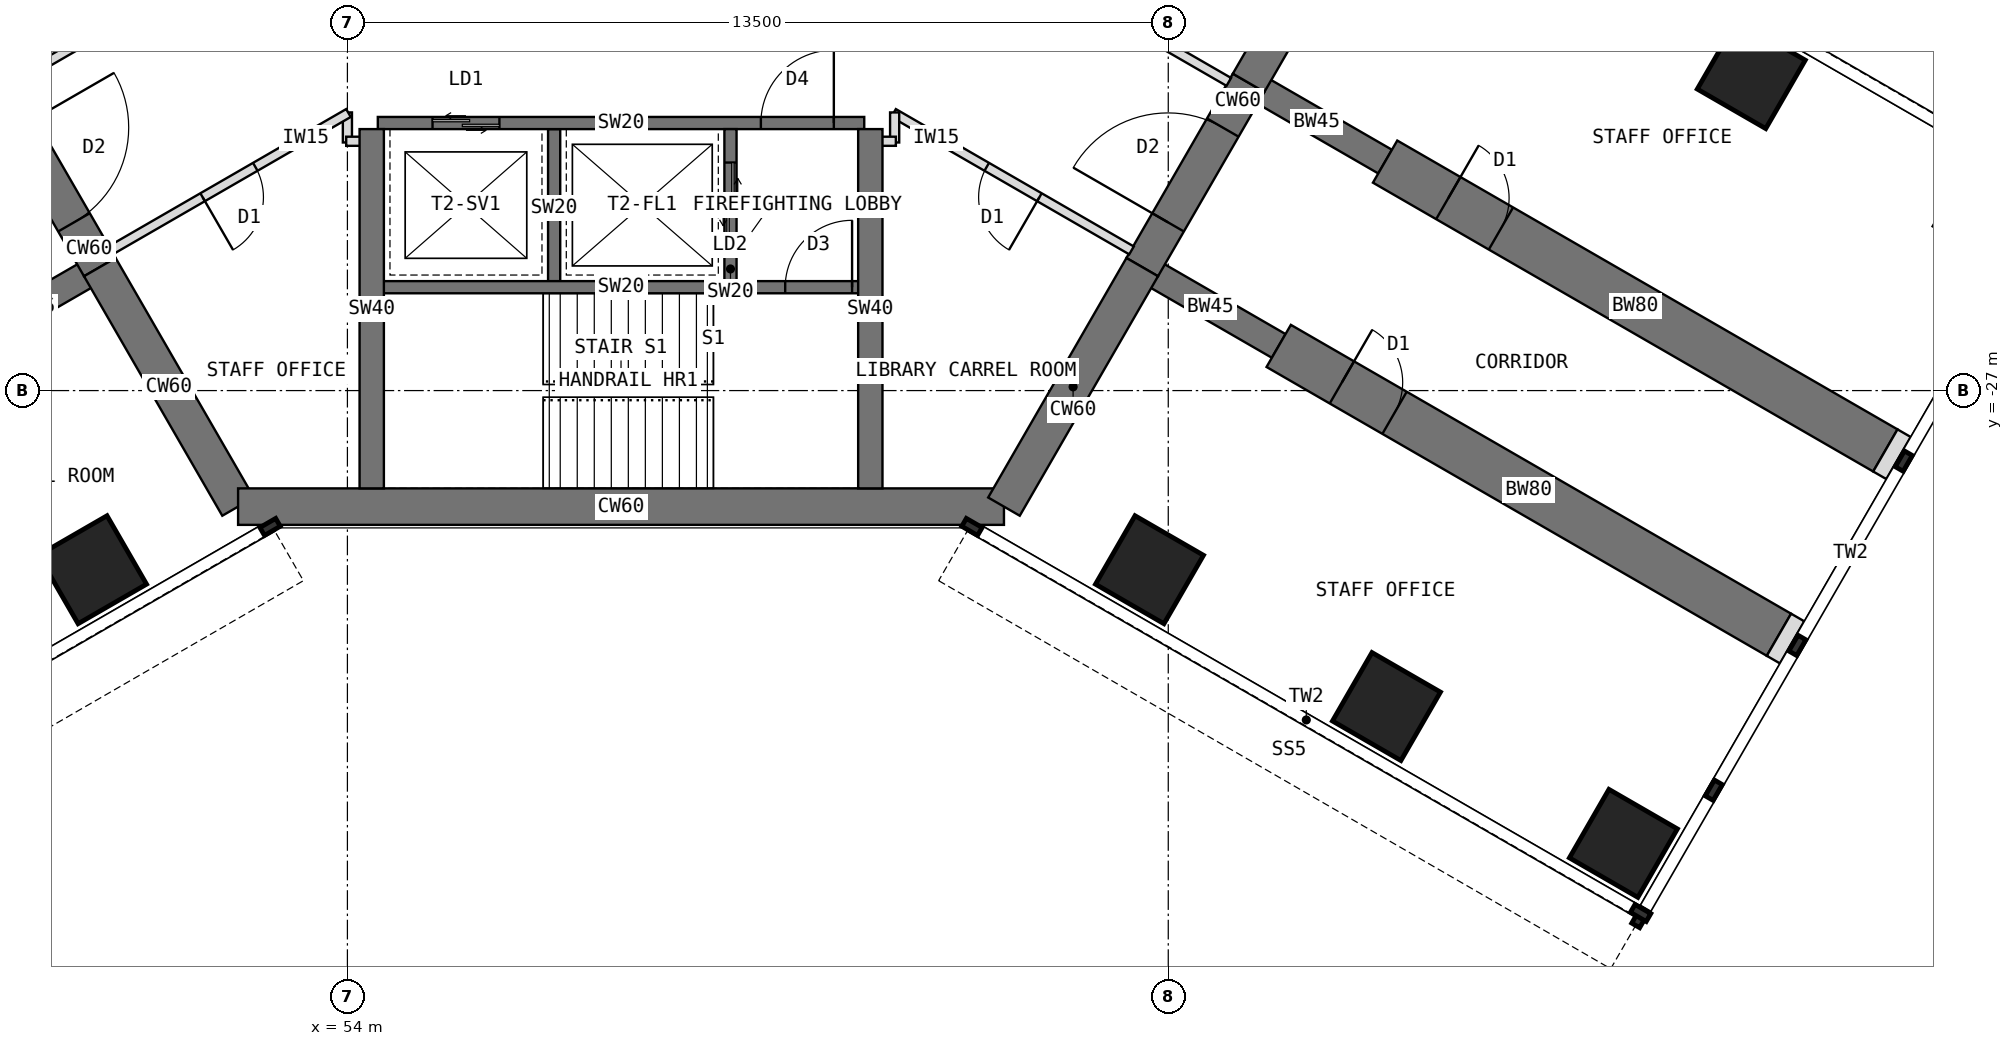
"""IFC4 building model, lengths in metres.
Left out: names, types, materials, properties, quantities, classifications, styles, units other than length and angle.
Written with IfcOpenShell. Run it as: python <this file> out.ifc"""

import sys

from ifc_helpers import new_model, si_unit, direction, frame, frame_2d, origin, origin_2d, place, context, subcontext, project, spatial, rectangle, extrude, element, fill, save


model = new_model("IFC4")
c1 = context("Model", 3, precision=1e-05, world=origin(), true_north=direction((0.0, 1.0)))
c2 = subcontext(c1, "Body", "Model", "MODEL_VIEW")
j1 = project(units=[si_unit("LENGTHUNIT", "METRE"), si_unit("PLANEANGLEUNIT", "RADIAN")], contexts=[c1])
p1 = place(None, origin())
s1 = spatial("IfcSite", under=j1, at=p1, CompositionType="ELEMENT")
p2 = place(p1, origin())
s2 = spatial("IfcBuilding", under=s1, at=p2, CompositionType="ELEMENT")
p3 = place(p2, frame((0.0, 0.0, 121.5)))
s3 = spatial("IfcBuildingStorey", under=s2, at=p3, CompositionType="ELEMENT", Elevation=121.5)
p4 = place(p3, frame((48.178, -21.939, 0.0), z_axis=(0.0, 0.0, 1.0), x_axis=(0.500010275428, -0.866019471182, 0.0)))
e1 = element("IfcWall", 1, at=p4, inside=s3, PredefinedType="SHEAR", context=c2, shape_type="SweptSolid", body=[
    extrude(rectangle(XDim=3.5, YDim=0.6, at=frame_2d((1.75, 0.0))), origin(), (0.0, 0.0, 1.0), 4.0),
])
p5 = place(p4, frame((0.85, 0.0, 0.0)))
e2 = element("IfcOpeningElement", 2, at=p5, cuts=e1, PredefinedType="OPENING", context=c2, shape_type="SweptSolid", body=[
    extrude(rectangle(XDim=1.8, YDim=2.1, at=frame_2d((0.9, 1.05))), frame((0.0, 0.31, 0.0), z_axis=(0.0, -1.0, 0.0), x_axis=(1.0, 0.0, 0.0)), (0.0, 0.0, 1.0), 0.62),
])
p6 = place(p3, frame((49.928, -24.97, 0.0), z_axis=(0.0, 0.0, 1.0), x_axis=(0.499984222037, -0.866034513004, 0.0)))
e3 = element("IfcWall", 3, at=p6, inside=s3, PredefinedType="SHEAR", context=c2, shape_type="SweptSolid", body=[
    extrude(rectangle(XDim=4.548, YDim=0.6, at=frame_2d((2.274, 0.0))), origin(), (0.0, 0.0, 1.0), 4.0),
])
p7 = place(p3, frame((52.202, -28.908, 0.0), z_axis=(0.0, 0.0, 1.0), x_axis=(1.0, 0.0, 0.0)))
e4 = element("IfcWall", 4, at=p7, inside=s3, PredefinedType="SHEAR", context=c2, shape_type="SweptSolid", body=[
    extrude(rectangle(XDim=12.596, YDim=0.6, at=frame_2d((6.298, 0.0))), origin(), (0.0, 0.0, 1.0), 4.0),
])
p8 = place(p3, frame((64.798, -28.908, 0.0), z_axis=(0.0, 0.0, 1.0), x_axis=(0.499984222037, 0.866034513004, 0.0)))
e5 = element("IfcWall", 5, at=p8, inside=s3, PredefinedType="SHEAR", context=c2, shape_type="SweptSolid", body=[
    extrude(rectangle(XDim=4.548, YDim=0.6, at=frame_2d((2.274, 0.0))), origin(), (0.0, 0.0, 1.0), 4.0),
])
p9 = place(p3, frame((67.072, -24.97, 0.0), z_axis=(0.0, 0.0, 1.0), x_axis=(0.500010275428, 0.866019471182, 0.0)))
e6 = element("IfcWall", 6, at=p9, inside=s3, PredefinedType="SHEAR", context=c2, shape_type="SweptSolid", body=[
    extrude(rectangle(XDim=3.5, YDim=0.6, at=frame_2d((1.75, 0.0))), origin(), (0.0, 0.0, 1.0), 4.0),
])
p10 = place(p9, frame((0.85, 0.0, 0.0)))
e7 = element("IfcOpeningElement", 7, at=p10, cuts=e6, PredefinedType="OPENING", context=c2, shape_type="SweptSolid", body=[
    extrude(rectangle(XDim=1.8, YDim=2.1, at=frame_2d((0.9, 1.05))), frame((0.0, 0.31, 0.0), z_axis=(0.0, -1.0, 0.0), x_axis=(1.0, 0.0, 0.0)), (0.0, 0.0, 1.0), 0.62),
])
p11 = place(p3, frame((68.822, -21.939, 0.0), z_axis=(0.0, 0.0, 1.0), x_axis=(0.500024481964, 0.866011268655, 0.0)))
e8 = element("IfcWall", 8, at=p11, inside=s3, PredefinedType="SHEAR", context=c2, shape_type="SweptSolid", body=[
    extrude(rectangle(XDim=4.548, YDim=0.6, at=frame_2d((2.274, 0.0))), origin(), (0.0, 0.0, 1.0), 4.0),
])
for number, where, z_axis, x_axis in (
    (9, (49.928, -24.97, 0.0), (0.0, 0.0, 1.0), (-0.866, -0.5, 0.0)),
    (10, (68.822, -21.939, 0.0), (0.0, 0.0, 1.0), (0.866, -0.5, 0.0)),
):
    element("IfcWall", number, at=place(p3, frame(where, z_axis=z_axis, x_axis=x_axis)), inside=s3, PredefinedType="SHEAR", context=c2, shape_type="SweptSolid", body=[
        extrude(rectangle(XDim=2.592, YDim=0.45, at=frame_2d((1.296, 0.0))), origin(), (0.0, 0.0, 1.0), 4.0),
    ])
p12 = place(p3, frame((71.066, -23.234, 0.0), z_axis=(0.0, 0.0, 1.0), x_axis=(0.86602681393, -0.499997557548, 0.0)))
e11 = element("IfcWall", 11, at=p12, inside=s3, PredefinedType="SHEAR", context=c2, shape_type="SweptSolid", body=[
    extrude(rectangle(XDim=9.5, YDim=0.8, at=frame_2d((4.75, 0.0))), origin(), (0.0, 0.0, 1.0), 4.0),
])
p13 = place(p12, frame((1.2, 0.0, 0.0)))
e12 = element("IfcOpeningElement", 12, at=p13, cuts=e11, PredefinedType="OPENING", context=c2, shape_type="SweptSolid", body=[
    extrude(rectangle(XDim=1.0, YDim=2.1, at=frame_2d((0.5, 1.05))), frame((0.0, 0.41, 0.0), z_axis=(0.0, -1.0, 0.0), x_axis=(1.0, 0.0, 0.0)), (0.0, 0.0, 1.0), 0.82),
])
p14 = place(p3, frame((67.072, -24.97, 0.0), z_axis=(0.0, 0.0, 1.0), x_axis=(0.866031863473, -0.499988811324, 0.0)))
e13 = element("IfcWall", 13, at=p14, inside=s3, PredefinedType="SHEAR", context=c2, shape_type="SweptSolid", body=[
    extrude(rectangle(XDim=2.592, YDim=0.45, at=frame_2d((1.296, 0.0))), origin(), (0.0, 0.0, 1.0), 4.0),
])
p15 = place(p3, frame((69.316, -26.266, 0.0), z_axis=(0.0, 0.0, 1.0), x_axis=(0.86602681393, -0.499997557548, 0.0)))
e14 = element("IfcWall", 14, at=p15, inside=s3, PredefinedType="SHEAR", context=c2, shape_type="SweptSolid", body=[
    extrude(rectangle(XDim=9.5, YDim=0.8, at=frame_2d((4.75, 0.0))), origin(), (0.0, 0.0, 1.0), 4.0),
])
p16 = place(p15, frame((1.2, 0.0, 0.0)))
e15 = element("IfcOpeningElement", 15, at=p16, cuts=e14, PredefinedType="OPENING", context=c2, shape_type="SweptSolid", body=[
    extrude(rectangle(XDim=1.0, YDim=2.1, at=frame_2d((0.5, 1.05))), frame((0.0, 0.41, 0.0), z_axis=(0.0, -1.0, 0.0), x_axis=(1.0, 0.0, 0.0)), (0.0, 0.0, 1.0), 0.82),
])
for number, where, z_axis, x_axis in (
    (16, (49.809, -29.946, 0.0), (0.0, 0.0, 1.0), (0.866, 0.5, 0.0)),
    (17, (67.191, -29.946, 0.0), (0.0, 0.0, 1.0), (0.5, 0.866, 0.0)),
    (18, (77.088, -21.804, 0.0), (0.0, 0.0, 1.0), (0.5, 0.866, 0.0)),
    (19, (71.088, -32.196, 0.0), (0.0, 0.0, 1.0), (0.5, 0.866, 0.0)),
    (20, (74.986, -34.446, 0.0), (0.0, 0.0, 1.0), (0.5, 0.866, 0.0)),
):
    element("IfcColumn", number, at=place(p3, frame(where, z_axis=z_axis, x_axis=x_axis)), inside=s3, PredefinedType="COLUMN", context=c2, shape_type="SweptSolid", body=[
        extrude(rectangle(XDim=1.3, YDim=1.3, at=origin_2d()), origin(), (0.0, 0.0, 1.0), 4.0),
    ])
for number, where, z_axis, x_axis in (
    (21, (79.294, -27.984, 0.0), (0.0, 0.0, 1.0), (0.866, -0.5, 0.0)),
    (22, (77.544, -31.016, 0.0), (0.0, 0.0, 1.0), (0.866, -0.5, 0.0)),
):
    element("IfcWall", number, at=place(p3, frame(where, z_axis=z_axis, x_axis=x_axis)), inside=s3, PredefinedType="PARTITIONING", context=c2, shape_type="SweptSolid", body=[
        extrude(rectangle(XDim=0.25, YDim=0.8, at=frame_2d((0.125, 0.0))), origin(), (0.0, 0.0, 1.0), 3.8),
    ])
p17 = place(p3, frame((54.5, -22.6, 0.0), z_axis=(0.0, 0.0, 1.0), x_axis=(1.0, 0.0, 0.0)))
e23 = element("IfcWall", 23, at=p17, inside=s3, PredefinedType="SHEAR", context=c2, shape_type="SweptSolid", body=[
    extrude(rectangle(XDim=8.0, YDim=0.2, at=frame_2d((4.0, 0.0))), origin(), (0.0, 0.0, 1.0), 4.0),
])
p18 = place(p17, frame((6.3, 0.0, 0.0)))
e24 = element("IfcOpeningElement", 24, at=p18, cuts=e23, PredefinedType="OPENING", context=c2, shape_type="SweptSolid", body=[
    extrude(rectangle(XDim=1.2, YDim=2.1, at=frame_2d((0.6, 1.05))), frame((0.0, 0.11, 0.0), z_axis=(0.0, -1.0, 0.0), x_axis=(1.0, 0.0, 0.0)), (0.0, 0.0, 1.0), 0.22),
])
p19 = place(p17, frame((0.9, 0.0, 0.0)))
e25 = element("IfcOpeningElement", 25, at=p19, cuts=e23, PredefinedType="OPENING", context=c2, shape_type="SweptSolid", body=[
    extrude(rectangle(XDim=1.1, YDim=2.2, at=frame_2d((0.55, 1.1))), frame((0.0, 0.11, 0.0), z_axis=(0.0, -1.0, 0.0), x_axis=(1.0, 0.0, 0.0)), (0.0, 0.0, 1.0), 0.22),
])
p20 = place(p3, frame((57.4, -22.7, 0.0), z_axis=(0.0, 0.0, 1.0), x_axis=(0.0, -1.0, 0.0)))
e26 = element("IfcWall", 26, at=p20, inside=s3, PredefinedType="SHEAR", context=c2, shape_type="SweptSolid", body=[
    extrude(rectangle(XDim=2.6, YDim=0.2, at=frame_2d((1.3, 0.0))), origin(), (0.0, 0.0, 1.0), 4.0),
])
p21 = place(p3, frame((60.3, -22.7, 0.0), z_axis=(0.0, 0.0, 1.0), x_axis=(0.0, -1.0, 0.0)))
e27 = element("IfcWall", 27, at=p21, inside=s3, PredefinedType="SHEAR", context=c2, shape_type="SweptSolid", body=[
    extrude(rectangle(XDim=2.6, YDim=0.2, at=frame_2d((1.3, 0.0))), origin(), (0.0, 0.0, 1.0), 4.0),
])
p22 = place(p21, frame((0.55, 0.0, 0.0)))
e28 = element("IfcOpeningElement", 28, at=p22, cuts=e27, PredefinedType="OPENING", context=c2, shape_type="SweptSolid", body=[
    extrude(rectangle(XDim=1.3, YDim=2.2, at=frame_2d((0.65, 1.1))), frame((0.0, 0.11, 0.0), z_axis=(0.0, -1.0, 0.0), x_axis=(1.0, 0.0, 0.0)), (0.0, 0.0, 1.0), 0.22),
])
p23 = place(p3, frame((54.5, -25.3, 0.0), z_axis=(0.0, 0.0, 1.0), x_axis=(1.0, 0.0, 0.0)))
e29 = element("IfcWall", 29, at=p23, inside=s3, PredefinedType="SHEAR", context=c2, shape_type="SweptSolid", body=[
    extrude(rectangle(XDim=8.0, YDim=0.2, at=frame_2d((4.0, 0.0))), origin(), (0.0, 0.0, 1.0), 4.0),
])
p24 = place(p23, frame((6.7, 0.0, 0.0)))
e30 = element("IfcOpeningElement", 30, at=p24, cuts=e29, PredefinedType="OPENING", context=c2, shape_type="SweptSolid", body=[
    extrude(rectangle(XDim=1.1, YDim=2.1, at=frame_2d((0.55, 1.05))), frame((0.0, 0.11, 0.0), z_axis=(0.0, -1.0, 0.0), x_axis=(1.0, 0.0, 0.0)), (0.0, 0.0, 1.0), 0.22),
])
for number, where, z_axis, x_axis in (
    (31, (62.6, -22.7, 0.0), (0.0, 0.0, 1.0), (0.0, -1.0, 0.0)),
    (32, (54.4, -22.7, 0.0), (0.0, 0.0, 1.0), (0.0, -1.0, 0.0)),
):
    element("IfcWall", number, at=place(p3, frame(where, z_axis=z_axis, x_axis=x_axis)), inside=s3, PredefinedType="SHEAR", context=c2, shape_type="SweptSolid", body=[
        extrude(rectangle(XDim=5.908, YDim=0.4, at=frame_2d((2.954, 0.0))), origin(), (0.0, 0.0, 1.0), 4.0),
    ])
p25 = place(p3, frame((54.0, -22.92, 0.0), z_axis=(0.0, 0.0, 1.0), x_axis=(0.0, 1.0, 0.0)))
e33 = element("IfcWall", 33, at=p25, inside=s3, PredefinedType="PARTITIONING", context=c2, shape_type="SweptSolid", body=[
    extrude(rectangle(XDim=0.494, YDim=0.15, at=frame_2d((0.247, 0.0))), origin(), (0.0, 0.0, 1.0), 3.8),
])
p26 = place(p3, frame((54.017, -22.436, 0.0), z_axis=(0.0, 0.0, 1.0), x_axis=(-0.86602002524, -0.500009315796, 0.0)))
e34 = element("IfcWall", 34, at=p26, inside=s3, PredefinedType="PARTITIONING", context=c2, shape_type="SweptSolid", body=[
    extrude(rectangle(XDim=4.519, YDim=0.15, at=frame_2d((2.259, 0.0))), origin(), (0.0, 0.0, 1.0), 3.8),
])
p27 = place(p26, frame((1.769, 0.0, 0.0)))
e35 = element("IfcOpeningElement", 35, at=p27, cuts=e34, PredefinedType="OPENING", context=c2, shape_type="SweptSolid", body=[
    extrude(rectangle(XDim=1.0, YDim=2.1, at=frame_2d((0.5, 1.05))), frame((0.0, 0.085, 0.0), z_axis=(0.0, -1.0, 0.0), x_axis=(1.0, 0.0, 0.0)), (0.0, 0.0, 1.0), 0.17),
])
p28 = place(p3, frame((48.504, -21.924, 0.0), z_axis=(0.0, 0.0, 1.0), x_axis=(0.866006515865, 0.500032713409, 0.0)))
e36 = element("IfcWall", 36, at=p28, inside=s3, PredefinedType="PARTITIONING", context=c2, shape_type="SweptSolid", body=[
    extrude(rectangle(XDim=4.518, YDim=0.15, at=frame_2d((2.259, 0.0))), origin(), (0.0, 0.0, 1.0), 3.8),
])
p29 = place(p28, frame((1.749, 0.0, 0.0)))
e37 = element("IfcOpeningElement", 37, at=p29, cuts=e36, PredefinedType="OPENING", context=c2, shape_type="SweptSolid", body=[
    extrude(rectangle(XDim=1.0, YDim=2.1, at=frame_2d((0.5, 1.05))), frame((0.0, 0.085, 0.0), z_axis=(0.0, -1.0, 0.0), x_axis=(1.0, 0.0, 0.0)), (0.0, 0.0, 1.0), 0.17),
])
p30 = place(p3, frame((64.583, -19.664, 0.0), z_axis=(0.0, 0.0, 1.0), x_axis=(0.866006515865, -0.500032713409, 0.0)))
e38 = element("IfcWall", 38, at=p30, inside=s3, PredefinedType="PARTITIONING", context=c2, shape_type="SweptSolid", body=[
    extrude(rectangle(XDim=4.518, YDim=0.15, at=frame_2d((2.259, 0.0))), origin(), (0.0, 0.0, 1.0), 3.8),
])
p31 = place(p30, frame((1.769, 0.0, 0.0)))
e39 = element("IfcOpeningElement", 39, at=p31, cuts=e38, PredefinedType="OPENING", context=c2, shape_type="SweptSolid", body=[
    extrude(rectangle(XDim=1.0, YDim=2.1, at=frame_2d((0.5, 1.05))), frame((0.0, 0.085, 0.0), z_axis=(0.0, -1.0, 0.0), x_axis=(1.0, 0.0, 0.0)), (0.0, 0.0, 1.0), 0.17),
])
p32 = place(p3, frame((66.896, -24.695, 0.0), z_axis=(0.0, 0.0, 1.0), x_axis=(-0.86602002524, 0.500009315796, 0.0)))
e40 = element("IfcWall", 40, at=p32, inside=s3, PredefinedType="PARTITIONING", context=c2, shape_type="SweptSolid", body=[
    extrude(rectangle(XDim=4.519, YDim=0.15, at=frame_2d((2.259, 0.0))), origin(), (0.0, 0.0, 1.0), 3.8),
])
p33 = place(p32, frame((1.749, 0.0, 0.0)))
e41 = element("IfcOpeningElement", 41, at=p33, cuts=e40, PredefinedType="OPENING", context=c2, shape_type="SweptSolid", body=[
    extrude(rectangle(XDim=1.0, YDim=2.1, at=frame_2d((0.5, 1.05))), frame((0.0, 0.085, 0.0), z_axis=(0.0, -1.0, 0.0), x_axis=(1.0, 0.0, 0.0)), (0.0, 0.0, 1.0), 0.17),
])
p34 = place(p3, frame((63.0, -22.426, 0.0), z_axis=(0.0, 0.0, 1.0), x_axis=(0.0, -1.0, 0.0)))
e42 = element("IfcWall", 42, at=p34, inside=s3, PredefinedType="PARTITIONING", context=c2, shape_type="SweptSolid", body=[
    extrude(rectangle(XDim=0.494, YDim=0.15, at=frame_2d((0.247, 0.0))), origin(), (0.0, 0.0, 1.0), 3.8),
])
for number, where, z_axis, x_axis in (
    (43, (63.02, -22.9, 0.0), (0.0, 0.0, 1.0), (-1.0, 0.0, 0.0)),
    (44, (54.41, -22.9, 0.0), (0.0, 0.0, 1.0), (-1.0, 0.0, 0.0)),
):
    element("IfcWall", number, at=place(p3, frame(where, z_axis=z_axis, x_axis=x_axis)), inside=s3, PredefinedType="PARTITIONING", context=c2, shape_type="SweptSolid", body=[
        extrude(rectangle(XDim=0.43, YDim=0.15, at=frame_2d((0.215, 0.0))), origin(), (0.0, 0.0, 1.0), 3.8),
    ])
p35 = place(p18, origin())
e45 = element("IfcDoor", 45, at=p35, inside=s3, OperationType="SINGLE_SWING_RIGHT", PredefinedType="DOOR", context=c2, shape_type="SweptSolid", body=[
    extrude(rectangle(XDim=1.2, YDim=2.1, at=frame_2d((0.6, 1.05))), frame((0.0, 0.025, 0.0), z_axis=(0.0, -1.0, 0.0), x_axis=(1.0, 0.0, 0.0)), (0.0, 0.0, 1.0), 0.05),
])
fill(e24, e45)
p36 = place(p22, origin())
e46 = element("IfcDoor", 46, at=p36, inside=s3, OperationType="DOUBLE_DOOR_SLIDING", PredefinedType="DOOR", context=c2, shape_type="SweptSolid", body=[
    extrude(rectangle(XDim=1.3, YDim=2.2, at=frame_2d((0.65, 1.1))), frame((0.0, 0.025, 0.0), z_axis=(0.0, -1.0, 0.0), x_axis=(1.0, 0.0, 0.0)), (0.0, 0.0, 1.0), 0.05),
])
fill(e28, e46)
p37 = place(p19, origin())
e47 = element("IfcDoor", 47, at=p37, inside=s3, OperationType="DOUBLE_DOOR_SLIDING", PredefinedType="DOOR", context=c2, shape_type="SweptSolid", body=[
    extrude(rectangle(XDim=1.1, YDim=2.2, at=frame_2d((0.55, 1.1))), frame((0.0, 0.025, 0.0), z_axis=(0.0, -1.0, 0.0), x_axis=(1.0, 0.0, 0.0)), (0.0, 0.0, 1.0), 0.05),
])
fill(e25, e47)
p38 = place(p24, origin())
e48 = element("IfcDoor", 48, at=p38, inside=s3, OperationType="SINGLE_SWING_RIGHT", PredefinedType="DOOR", context=c2, shape_type="SweptSolid", body=[
    extrude(rectangle(XDim=1.1, YDim=2.1, at=frame_2d((0.55, 1.05))), frame((0.0, 0.025, 0.0), z_axis=(0.0, -1.0, 0.0), x_axis=(1.0, 0.0, 0.0)), (0.0, 0.0, 1.0), 0.05),
])
fill(e30, e48)
p39 = place(p5, origin())
e49 = element("IfcDoor", 49, at=p39, inside=s3, OperationType="DOUBLE_DOOR_DOUBLE_SWING", PredefinedType="DOOR", context=c2, shape_type="SweptSolid", body=[
    extrude(rectangle(XDim=1.72, YDim=2.06, at=frame_2d((0.9, 1.03))), frame((0.0, 0.025, 0.0), z_axis=(0.0, -1.0, 0.0), x_axis=(1.0, 0.0, 0.0)), (0.0, 0.0, 1.0), 0.05),
    extrude(rectangle(XDim=0.04, YDim=2.1, at=frame_2d((0.02, 1.05))), frame((0.0, 0.3, 0.0), z_axis=(0.0, -1.0, 0.0), x_axis=(1.0, 0.0, 0.0)), (0.0, 0.0, 1.0), 0.6),
    extrude(rectangle(XDim=0.04, YDim=2.1, at=frame_2d((1.78, 1.05))), frame((0.0, 0.3, 0.0), z_axis=(0.0, -1.0, 0.0), x_axis=(1.0, 0.0, 0.0)), (0.0, 0.0, 1.0), 0.6),
    extrude(rectangle(XDim=1.72, YDim=0.04, at=frame_2d((0.9, 2.08))), frame((0.0, 0.3, 0.0), z_axis=(0.0, -1.0, 0.0), x_axis=(1.0, 0.0, 0.0)), (0.0, 0.0, 1.0), 0.6),
])
fill(e2, e49)
p40 = place(p10, origin())
e50 = element("IfcDoor", 50, at=p40, inside=s3, OperationType="DOUBLE_DOOR_DOUBLE_SWING", PredefinedType="DOOR", context=c2, shape_type="SweptSolid", body=[
    extrude(rectangle(XDim=1.72, YDim=2.06, at=frame_2d((0.9, 1.03))), frame((0.0, 0.025, 0.0), z_axis=(0.0, -1.0, 0.0), x_axis=(1.0, 0.0, 0.0)), (0.0, 0.0, 1.0), 0.05),
    extrude(rectangle(XDim=0.04, YDim=2.1, at=frame_2d((0.02, 1.05))), frame((0.0, 0.3, 0.0), z_axis=(0.0, -1.0, 0.0), x_axis=(1.0, 0.0, 0.0)), (0.0, 0.0, 1.0), 0.6),
    extrude(rectangle(XDim=0.04, YDim=2.1, at=frame_2d((1.78, 1.05))), frame((0.0, 0.3, 0.0), z_axis=(0.0, -1.0, 0.0), x_axis=(1.0, 0.0, 0.0)), (0.0, 0.0, 1.0), 0.6),
    extrude(rectangle(XDim=1.72, YDim=0.04, at=frame_2d((0.9, 2.08))), frame((0.0, 0.3, 0.0), z_axis=(0.0, -1.0, 0.0), x_axis=(1.0, 0.0, 0.0)), (0.0, 0.0, 1.0), 0.6),
])
fill(e7, e50)
p41 = place(p27, origin())
e51 = element("IfcDoor", 51, at=p41, inside=s3, OperationType="SINGLE_SWING_RIGHT", PredefinedType="DOOR", context=c2, shape_type="SweptSolid", body=[
    extrude(rectangle(XDim=1.0, YDim=2.1, at=frame_2d((0.5, 1.05))), frame((0.0, 0.025, 0.0), z_axis=(0.0, -1.0, 0.0), x_axis=(1.0, 0.0, 0.0)), (0.0, 0.0, 1.0), 0.05),
])
fill(e35, e51)
p42 = place(p33, origin())
e52 = element("IfcDoor", 52, at=p42, inside=s3, OperationType="SINGLE_SWING_LEFT", PredefinedType="DOOR", context=c2, shape_type="SweptSolid", body=[
    extrude(rectangle(XDim=1.0, YDim=2.1, at=frame_2d((0.5, 1.05))), frame((0.0, 0.025, 0.0), z_axis=(0.0, -1.0, 0.0), x_axis=(1.0, 0.0, 0.0)), (0.0, 0.0, 1.0), 0.05),
])
fill(e41, e52)
p43 = place(p13, origin())
e53 = element("IfcDoor", 53, at=p43, inside=s3, OperationType="SINGLE_SWING_LEFT", PredefinedType="DOOR", context=c2, shape_type="SweptSolid", body=[
    extrude(rectangle(XDim=0.92, YDim=2.06, at=frame_2d((0.5, 1.03))), frame((0.0, 0.025, 0.0), z_axis=(0.0, -1.0, 0.0), x_axis=(1.0, 0.0, 0.0)), (0.0, 0.0, 1.0), 0.05),
    extrude(rectangle(XDim=0.04, YDim=2.1, at=frame_2d((0.02, 1.05))), frame((0.0, 0.4, 0.0), z_axis=(0.0, -1.0, 0.0), x_axis=(1.0, 0.0, 0.0)), (0.0, 0.0, 1.0), 0.8),
    extrude(rectangle(XDim=0.04, YDim=2.1, at=frame_2d((0.98, 1.05))), frame((0.0, 0.4, 0.0), z_axis=(0.0, -1.0, 0.0), x_axis=(1.0, 0.0, 0.0)), (0.0, 0.0, 1.0), 0.8),
    extrude(rectangle(XDim=0.92, YDim=0.04, at=frame_2d((0.5, 2.08))), frame((0.0, 0.4, 0.0), z_axis=(0.0, -1.0, 0.0), x_axis=(1.0, 0.0, 0.0)), (0.0, 0.0, 1.0), 0.8),
])
fill(e12, e53)
p44 = place(p16, origin())
e54 = element("IfcDoor", 54, at=p44, inside=s3, OperationType="SINGLE_SWING_LEFT", PredefinedType="DOOR", context=c2, shape_type="SweptSolid", body=[
    extrude(rectangle(XDim=0.92, YDim=2.06, at=frame_2d((0.5, 1.03))), frame((0.0, 0.025, 0.0), z_axis=(0.0, -1.0, 0.0), x_axis=(1.0, 0.0, 0.0)), (0.0, 0.0, 1.0), 0.05),
    extrude(rectangle(XDim=0.04, YDim=2.1, at=frame_2d((0.02, 1.05))), frame((0.0, 0.4, 0.0), z_axis=(0.0, -1.0, 0.0), x_axis=(1.0, 0.0, 0.0)), (0.0, 0.0, 1.0), 0.8),
    extrude(rectangle(XDim=0.04, YDim=2.1, at=frame_2d((0.98, 1.05))), frame((0.0, 0.4, 0.0), z_axis=(0.0, -1.0, 0.0), x_axis=(1.0, 0.0, 0.0)), (0.0, 0.0, 1.0), 0.8),
    extrude(rectangle(XDim=0.92, YDim=0.04, at=frame_2d((0.5, 2.08))), frame((0.0, 0.4, 0.0), z_axis=(0.0, -1.0, 0.0), x_axis=(1.0, 0.0, 0.0)), (0.0, 0.0, 1.0), 0.8),
])
fill(e15, e54)
save(model, sys.argv[1])
